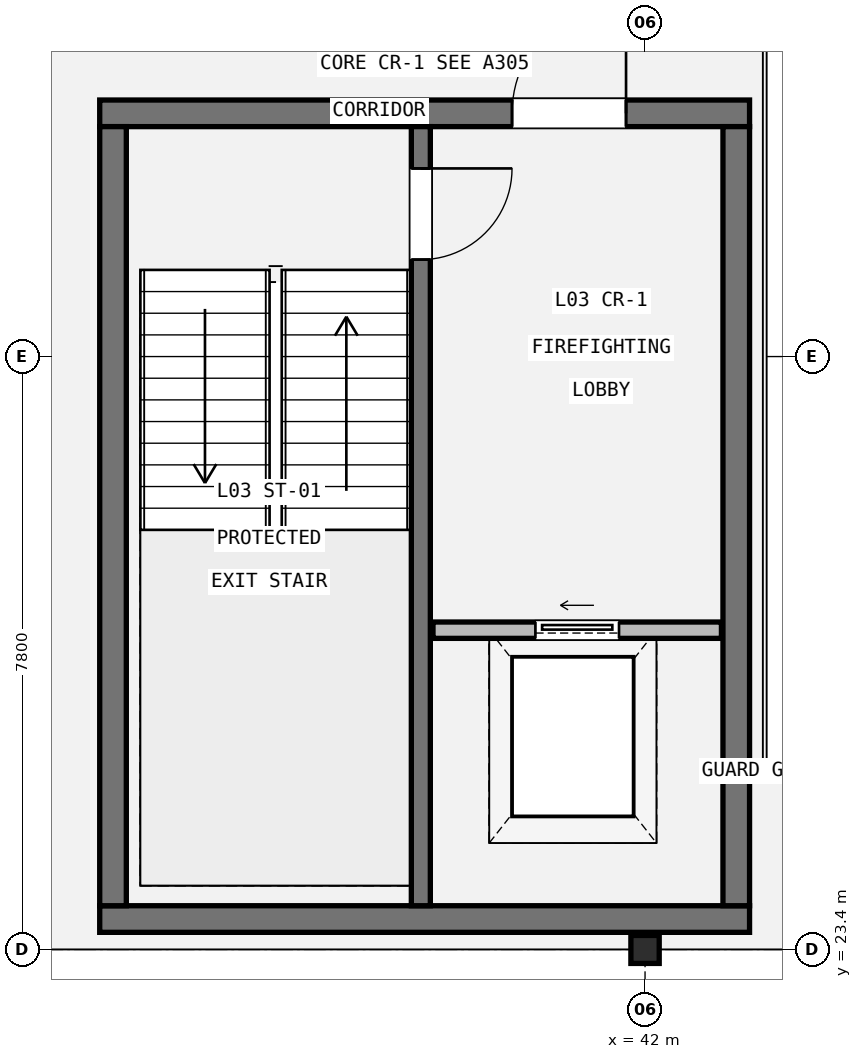
"""IFC4 building model, lengths in metres.
Left out: names, types, materials, properties, quantities, classifications, styles, units other than length and angle.
Written with IfcOpenShell. Run it as: python <this file> out.ifc"""

import sys

from ifc_helpers import new_model, si_unit, direction, frame, frame_2d, origin, origin_2d, place, context, subcontext, project, spatial, rectangle, i_section, extrude, element, fill, save


model = new_model("IFC4")
c1 = context("Model", 3, precision=1e-05, world=origin(), true_north=direction((0.0, 1.0)))
c2 = subcontext(c1, "Body", "Model", "MODEL_VIEW")
j1 = project(units=[si_unit("LENGTHUNIT", "METRE"), si_unit("PLANEANGLEUNIT", "RADIAN")], contexts=[c1])
p1 = place(None, origin())
s1 = spatial("IfcSite", under=j1, at=p1, CompositionType="ELEMENT")
p2 = place(p1, origin())
s2 = spatial("IfcBuilding", under=s1, at=p2, CompositionType="ELEMENT")
p3 = place(p2, frame((0.0, 0.0, 15.0)))
s3 = spatial("IfcBuildingStorey", under=s2, at=p3, CompositionType="ELEMENT", Elevation=15.0)
p4 = place(p3, frame((42.0, 23.4, 0.0), z_axis=(0.0, 0.0, 1.0), x_axis=(1.0, 0.0, 0.0)))
e1 = element("IfcColumn", 1, at=p4, inside=s3, PredefinedType="COLUMN", context=c2, shape_type="SweptSolid", body=[
    extrude(i_section(OverallWidth=0.373, OverallDepth=0.368, WebThickness=0.014, FlangeThickness=0.024, FilletRadius=0.015, at=origin_2d()), origin(), (0.0, 0.0, 1.0), 4.2),
])
p5 = place(p3, frame((43.375, 23.8, 0.0), z_axis=(0.0, 0.0, 1.0), x_axis=(-1.0, 0.0, 0.0)))
e2 = element("IfcWall", 2, at=p5, inside=s3, PredefinedType="SHEAR", context=c2, shape_type="SweptSolid", body=[
    extrude(rectangle(XDim=8.55, YDim=0.35, at=frame_2d((4.275, 0.0))), origin(), (0.0, 0.0, 1.0), 4.0),
])
p6 = place(p3, frame((34.825, 34.4, 0.0), z_axis=(0.0, 0.0, 1.0), x_axis=(1.0, 0.0, 0.0)))
e3 = element("IfcWall", 3, at=p6, inside=s3, PredefinedType="SHEAR", context=c2, shape_type="SweptSolid", body=[
    extrude(rectangle(XDim=8.55, YDim=0.35, at=frame_2d((4.275, 0.0))), origin(), (0.0, 0.0, 1.0), 4.0),
])
p7 = place(p6, frame((5.425, 0.0, 0.0)))
e4 = element("IfcOpeningElement", 4, at=p7, cuts=e3, PredefinedType="OPENING", context=c2, shape_type="SweptSolid", body=[
    extrude(rectangle(XDim=1.5, YDim=2.15, at=frame_2d((0.75, 1.075))), frame((0.0, 0.185, 0.0), z_axis=(0.0, -1.0, 0.0), x_axis=(1.0, 0.0, 0.0)), (0.0, 0.0, 1.0), 0.37),
])
for number, where, z_axis, x_axis in (
    (5, (35.0, 23.975, 0.0), (0.0, 0.0, 1.0), (0.0, 1.0, 0.0)),
    (6, (43.2, 34.225, 0.0), (0.0, 0.0, 1.0), (0.0, -1.0, 0.0)),
):
    element("IfcWall", number, at=place(p3, frame(where, z_axis=z_axis, x_axis=x_axis)), inside=s3, PredefinedType="SHEAR", context=c2, shape_type="SweptSolid", body=[
        extrude(rectangle(XDim=10.25, YDim=0.35, at=frame_2d((5.125, 0.0))), origin(), (0.0, 0.0, 1.0), 4.0),
    ])
p8 = place(p3, frame((39.05, 34.225, 0.0), z_axis=(0.0, 0.0, 1.0), x_axis=(0.0, -1.0, 0.0)))
e7 = element("IfcWall", 7, at=p8, inside=s3, PredefinedType="SHEAR", context=c2, shape_type="SweptSolid", body=[
    extrude(rectangle(XDim=10.25, YDim=0.25, at=frame_2d((5.125, 0.0))), origin(), (0.0, 0.0, 1.0), 4.0),
])
p9 = place(p8, frame((0.55, 0.0, 0.0)))
e8 = element("IfcOpeningElement", 8, at=p9, cuts=e7, PredefinedType="OPENING", context=c2, shape_type="SweptSolid", body=[
    extrude(rectangle(XDim=1.2, YDim=2.15, at=frame_2d((0.6, 1.075))), frame((0.0, 0.135, 0.0), z_axis=(0.0, -1.0, 0.0), x_axis=(1.0, 0.0, 0.0)), (0.0, 0.0, 1.0), 0.27),
])
p10 = place(p3, frame((39.21, 27.6, 0.0), z_axis=(0.0, 0.0, 1.0), x_axis=(1.0, 0.0, 0.0)))
e9 = element("IfcWall", 9, at=p10, inside=s3, PredefinedType="STANDARD", context=c2, shape_type="SweptSolid", body=[
    extrude(rectangle(XDim=3.795, YDim=0.215, at=frame_2d((1.897, 0.0))), origin(), (0.0, 0.0, 1.0), 3.992),
])
p11 = place(p10, frame((1.347, 0.0, 0.0)))
e10 = element("IfcOpeningElement", 10, at=p11, cuts=e9, PredefinedType="OPENING", context=c2, shape_type="SweptSolid", body=[
    extrude(rectangle(XDim=1.1, YDim=2.2, at=frame_2d((0.55, 1.1))), frame((0.0, 0.117, 0.0), z_axis=(0.0, -1.0, 0.0), x_axis=(1.0, 0.0, 0.0)), (0.0, 0.0, 1.0), 0.235),
])
p12 = place(p9, origin())
e11 = element("IfcDoor", 11, at=p12, inside=s3, OperationType="SINGLE_SWING_LEFT", PredefinedType="DOOR", context=c2, shape_type="SweptSolid", body=[
    extrude(rectangle(XDim=1.2, YDim=2.15, at=frame_2d((0.6, 1.075))), frame((0.0, 0.025, 0.0), z_axis=(0.0, -1.0, 0.0), x_axis=(1.0, 0.0, 0.0)), (0.0, 0.0, 1.0), 0.05),
])
fill(e8, e11)
p13 = place(p7, origin())
e12 = element("IfcDoor", 12, at=p13, inside=s3, OperationType="SINGLE_SWING_RIGHT", PredefinedType="DOOR", context=c2, shape_type="SweptSolid", body=[
    extrude(rectangle(XDim=1.5, YDim=2.15, at=frame_2d((0.75, 1.075))), frame((0.0, 0.025, 0.0), z_axis=(0.0, -1.0, 0.0), x_axis=(1.0, 0.0, 0.0)), (0.0, 0.0, 1.0), 0.05),
])
fill(e4, e12)
p14 = place(p11, origin())
e13 = element("IfcDoor", 13, at=p14, inside=s3, OperationType="SLIDING_TO_LEFT", PredefinedType="DOOR", context=c2, shape_type="SweptSolid", body=[
    extrude(rectangle(XDim=1.1, YDim=2.2, at=frame_2d((0.55, 1.1))), frame((0.0, 0.025, 0.0), z_axis=(0.0, -1.0, 0.0), x_axis=(1.0, 0.0, 0.0)), (0.0, 0.0, 1.0), 0.05),
])
fill(e10, e13)
save(model, sys.argv[1])
